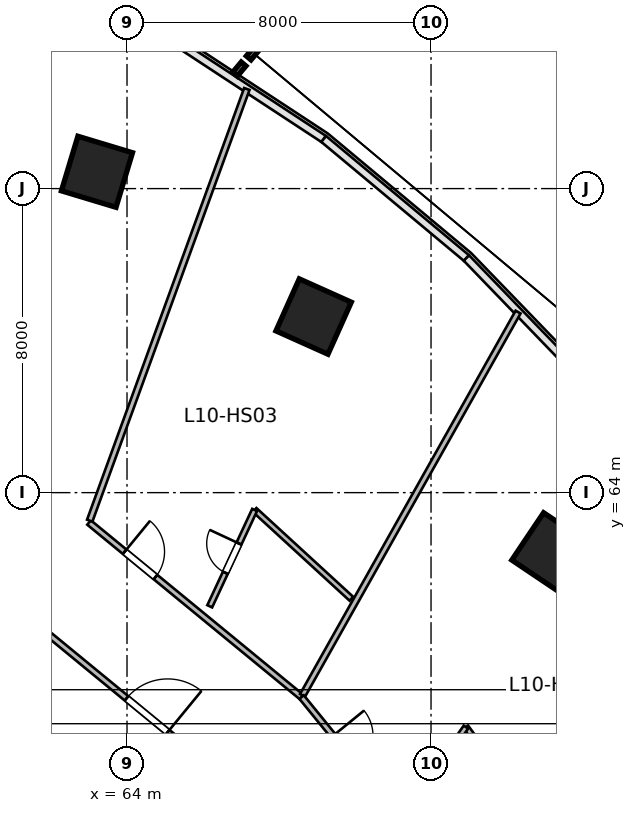
"""IFC4 building model, lengths in metres.
Left out: names, types, materials, properties, quantities, classifications, styles, units other than length and angle.
Written with IfcOpenShell. Run it as: python <this file> out.ifc"""

import sys

from ifc_helpers import new_model, si_unit, direction, frame, frame_2d, origin, origin_2d, place, context, subcontext, project, spatial, rectangle, extrude, source, transform, mapped, element, fill, save


model = new_model("IFC4")
c1 = context("Model", 3, precision=1e-05, world=origin(), true_north=direction((0.0, 1.0)))
c2 = subcontext(c1, "Body", "Model", "MODEL_VIEW")
j1 = project(units=[si_unit("LENGTHUNIT", "METRE"), si_unit("PLANEANGLEUNIT", "RADIAN")], contexts=[c1])
p1 = place(None, origin())
s1 = spatial("IfcSite", under=j1, at=p1, CompositionType="ELEMENT")
p2 = place(p1, origin())
s2 = spatial("IfcBuilding", under=s1, at=p2, CompositionType="ELEMENT")
p3 = place(p2, frame((0.0, 0.0, 49.8)))
s3 = spatial("IfcBuildingStorey", under=s2, at=p3, CompositionType="ELEMENT", Elevation=49.8)
m1 = source(origin(), c2, "Body", "SweptSolid", [
    extrude(rectangle(XDim=1.5, YDim=1.5, at=origin_2d()), origin(), (0.0, 0.0, 1.0), 3.6),
])
for number, where, z_axis, x_axis in (
    (1, (63.209, 72.442, 0.0), (0.0, 0.0, 1.0), (0.289, 0.957, 0.0)),
    (2, (68.91, 68.633, 0.0), (0.0, 0.0, 1.0), (0.409, 0.912, 0.0)),
    (3, (75.167, 62.43, 0.0), (0.0, 0.0, 1.0), (0.558, 0.83, 0.0)),
):
    element("IfcColumn", number, at=place(p3, frame(where, z_axis=z_axis, x_axis=x_axis)), inside=s3, PredefinedType="COLUMN", context=c2, shape_type="MappedRepresentation", body=[
        mapped(m1, transform((0.0, 0.0, 0.0), scale=1.0)),
    ])
m2 = source(origin(), c2, "Body", "SweptSolid", [
    extrude(rectangle(XDim=7.237, YDim=0.15, at=frame_2d((3.618, 0.0))), origin(), (0.0, 0.0, 1.0), 3.36),
])
p4 = place(p3, frame((63.001, 63.214, 0.0), z_axis=(0.0, 0.0, 1.0), x_axis=(0.772813707793, -0.634632943557, 0.0)))
e4 = element("IfcWall", 4, at=p4, inside=s3, PredefinedType="PARTITIONING", context=c2, shape_type="MappedRepresentation", body=[
    mapped(m2, transform((0.0, 0.0, 0.0), scale=1.0)),
])
p5 = place(p4, frame((1.212, 0.0, 0.0)))
e5 = element("IfcOpeningElement", 5, at=p5, cuts=e4, PredefinedType="OPENING", context=c2, shape_type="SweptSolid", body=[
    extrude(rectangle(XDim=1.05, YDim=2.15, at=frame_2d((0.525, 1.075))), frame((0.0, 0.085, 0.0), z_axis=(0.0, -1.0, 0.0), x_axis=(1.0, 0.0, 0.0)), (0.0, 0.0, 1.0), 0.17),
])
m3 = source(origin(), c2, "Body", "SweptSolid", [
    extrude(rectangle(XDim=12.088, YDim=0.15, at=frame_2d((6.044, 0.0))), origin(), (0.0, 0.0, 1.0), 3.36),
])
p6 = place(p3, frame((63.019, 63.262, 0.0), z_axis=(0.0, 0.0, 1.0), x_axis=(0.34203007529, 0.939689005787, 0.0)))
e6 = element("IfcWall", 6, at=p6, inside=s3, PredefinedType="PARTITIONING", context=c2, shape_type="MappedRepresentation", body=[
    mapped(m3, transform((0.0, 0.0, 0.0), scale=1.0)),
])
m4 = source(origin(), c2, "Body", "SweptSolid", [
    extrude(rectangle(XDim=11.573, YDim=0.15, at=frame_2d((5.786, 0.0))), origin(), (0.0, 0.0, 1.0), 3.36),
])
p7 = place(p3, frame((68.618, 58.664, 0.0), z_axis=(0.0, 0.0, 1.0), x_axis=(0.490161073951, 0.871631872744, 0.0)))
e7 = element("IfcWall", 7, at=p7, inside=s3, PredefinedType="PARTITIONING", context=c2, shape_type="MappedRepresentation", body=[
    mapped(m4, transform((0.0, 0.0, 0.0), scale=1.0)),
])
m5 = source(origin(), c2, "Body", "SweptSolid", [
    extrude(rectangle(XDim=3.456, YDim=0.14, at=frame_2d((1.728, 0.0))), origin(), (0.0, 0.0, 1.0), 3.36),
])
p8 = place(p3, frame((67.358, 63.544, 0.0), z_axis=(0.0, 0.0, 1.0), x_axis=(0.736860870293, -0.676044420013, 0.0)))
e8 = element("IfcWall", 8, at=p8, inside=s3, PredefinedType="PARTITIONING", context=c2, shape_type="MappedRepresentation", body=[
    mapped(m5, transform((0.0, 0.0, 0.0), scale=1.0)),
])
m6 = source(origin(), c2, "Body", "SweptSolid", [
    extrude(rectangle(XDim=2.796, YDim=0.14, at=frame_2d((1.398, 0.0))), origin(), (0.0, 0.0, 1.0), 3.36),
])
p9 = place(p3, frame((66.177, 61.009, 0.0), z_axis=(0.0, 0.0, 1.0), x_axis=(0.422316594955, 0.906448395456, 0.0)))
e9 = element("IfcWall", 9, at=p9, inside=s3, PredefinedType="PARTITIONING", context=c2, shape_type="MappedRepresentation", body=[
    mapped(m6, transform((0.0, 0.0, 0.0), scale=1.0)),
])
p10 = place(p9, frame((0.973, 0.0, 0.0)))
e10 = element("IfcOpeningElement", 10, at=p10, cuts=e9, PredefinedType="OPENING", context=c2, shape_type="SweptSolid", body=[
    extrude(rectangle(XDim=0.85, YDim=2.05, at=frame_2d((0.425, 1.025))), frame((0.0, 0.08, 0.0), z_axis=(0.0, -1.0, 0.0), x_axis=(1.0, 0.0, 0.0)), (0.0, 0.0, 1.0), 0.16),
])
m7 = source(origin(), c2, "Body", "SweptSolid", [
    extrude(rectangle(XDim=7.659, YDim=0.15, at=frame_2d((3.829, 0.0))), origin(), (0.0, 0.0, 1.0), 3.36),
])
p11 = place(p3, frame((68.594, 58.621, 0.0), z_axis=(0.0, 0.0, 1.0), x_axis=(0.631489868862, -0.775384127723, 0.0)))
e11 = element("IfcWall", 11, at=p11, inside=s3, PredefinedType="PARTITIONING", context=c2, shape_type="MappedRepresentation", body=[
    mapped(m7, transform((0.0, 0.0, 0.0), scale=1.0)),
])
p12 = place(p11, frame((1.313, 0.0, 0.0)))
e12 = element("IfcOpeningElement", 12, at=p12, cuts=e11, PredefinedType="OPENING", context=c2, shape_type="SweptSolid", body=[
    extrude(rectangle(XDim=1.05, YDim=2.15, at=frame_2d((0.525, 1.075))), frame((0.0, 0.085, 0.0), z_axis=(0.0, -1.0, 0.0), x_axis=(1.0, 0.0, 0.0)), (0.0, 0.0, 1.0), 0.17),
])
m8 = source(origin(), c2, "Body", "SweptSolid", [
    extrude(rectangle(XDim=10.975, YDim=0.15, at=frame_2d((5.487, 0.0))), origin(), (0.0, 0.0, 1.0), 3.36),
])
p13 = place(p3, frame((73.46, 52.719, 0.0), z_axis=(0.0, 0.0, 1.0), x_axis=(0.638125265812, 0.769932558821, 0.0)))
e13 = element("IfcWall", 13, at=p13, inside=s3, PredefinedType="PARTITIONING", context=c2, shape_type="MappedRepresentation", body=[
    mapped(m8, transform((0.0, 0.0, 0.0), scale=1.0)),
])
m9 = source(origin(), c2, "Body", "SweptSolid", [
    extrude(rectangle(XDim=3.656, YDim=0.14, at=frame_2d((1.828, 0.0))), origin(), (0.0, 0.0, 1.0), 3.36),
])
p14 = place(p3, frame((72.918, 57.831, 0.0), z_axis=(0.0, 0.0, 1.0), x_axis=(0.592700141555, -0.805423206892, 0.0)))
e14 = element("IfcWall", 14, at=p14, inside=s3, PredefinedType="PARTITIONING", context=c2, shape_type="MappedRepresentation", body=[
    mapped(m9, transform((0.0, 0.0, 0.0), scale=1.0)),
])
m10 = source(origin(), c2, "Body", "SweptSolid", [
    extrude(rectangle(XDim=2.663, YDim=0.14, at=frame_2d((1.332, 0.0))), origin(), (0.0, 0.0, 1.0), 3.36),
])
p15 = place(p3, frame((71.397, 55.645, 0.0), z_axis=(0.0, 0.0, 1.0), x_axis=(0.570905989724, 0.821015438891, 0.0)))
e15 = element("IfcWall", 15, at=p15, inside=s3, PredefinedType="PARTITIONING", context=c2, shape_type="MappedRepresentation", body=[
    mapped(m10, transform((0.0, 0.0, 0.0), scale=1.0)),
])
p16 = place(p15, frame((0.906, 0.0, 0.0)))
e16 = element("IfcOpeningElement", 16, at=p16, cuts=e15, PredefinedType="OPENING", context=c2, shape_type="SweptSolid", body=[
    extrude(rectangle(XDim=0.85, YDim=2.05, at=frame_2d((0.425, 1.025))), frame((0.0, 0.08, 0.0), z_axis=(0.0, -1.0, 0.0), x_axis=(1.0, 0.0, 0.0)), (0.0, 0.0, 1.0), 0.16),
])
m11 = source(origin(), c2, "Body", "SweptSolid", [
    extrude(rectangle(XDim=6.721, YDim=0.15, at=frame_2d((3.361, 0.0))), origin(), (0.0, 0.0, 1.0), 3.36),
])
p17 = place(p3, frame((61.931, 60.275, 0.0), z_axis=(0.0, 0.0, 1.0), x_axis=(0.772828051199, -0.63461547671, 0.0)))
e17 = element("IfcWall", 17, at=p17, inside=s3, PredefinedType="PARTITIONING", context=c2, shape_type="MappedRepresentation", body=[
    mapped(m11, transform((0.0, 0.0, 0.0), scale=1.0)),
])
p18 = place(p17, frame((2.66, 0.0, 0.0)))
e18 = element("IfcOpeningElement", 18, at=p18, cuts=e17, PredefinedType="OPENING", context=c2, shape_type="SweptSolid", body=[
    extrude(rectangle(XDim=1.4, YDim=2.15, at=frame_2d((0.7, 1.075))), frame((0.0, 0.085, 0.0), z_axis=(0.0, -1.0, 0.0), x_axis=(1.0, 0.0, 0.0)), (0.0, 0.0, 1.0), 0.17),
])
m12 = source(origin(), c2, "Body", "SweptSolid", [
    extrude(rectangle(XDim=1.05, YDim=2.15, at=frame_2d((0.525, 1.075))), frame((0.0, 0.025, 0.0), z_axis=(0.0, -1.0, 0.0), x_axis=(1.0, 0.0, 0.0)), (0.0, 0.0, 1.0), 0.05),
])
p19 = place(p5, origin())
e19 = element("IfcDoor", 19, at=p19, inside=s3, OperationType="SINGLE_SWING_LEFT", PredefinedType="DOOR", context=c2, shape_type="MappedRepresentation", body=[
    mapped(m12, transform((0.0, 0.0, 0.0), scale=1.0)),
])
fill(e5, e19)
m13 = source(origin(), c2, "Body", "SweptSolid", [
    extrude(rectangle(XDim=0.85, YDim=2.05, at=frame_2d((0.425, 1.025))), frame((0.0, 0.025, 0.0), z_axis=(0.0, -1.0, 0.0), x_axis=(1.0, 0.0, 0.0)), (0.0, 0.0, 1.0), 0.05),
])
p20 = place(p10, origin())
e20 = element("IfcDoor", 20, at=p20, inside=s3, OperationType="SINGLE_SWING_RIGHT", PredefinedType="DOOR", context=c2, shape_type="MappedRepresentation", body=[
    mapped(m13, transform((0.0, 0.0, 0.0), scale=1.0)),
])
fill(e10, e20)
m14 = source(origin(), c2, "Body", "SweptSolid", [
    extrude(rectangle(XDim=1.4, YDim=2.15, at=frame_2d((0.7, 1.075))), frame((0.0, 0.025, 0.0), z_axis=(0.0, -1.0, 0.0), x_axis=(1.0, 0.0, 0.0)), (0.0, 0.0, 1.0), 0.05),
])
p21 = place(p18, origin())
e21 = element("IfcDoor", 21, at=p21, inside=s3, OperationType="SINGLE_SWING_RIGHT", PredefinedType="DOOR", context=c2, shape_type="MappedRepresentation", body=[
    mapped(m14, transform((0.0, 0.0, 0.0), scale=1.0)),
])
fill(e18, e21)
save(model, sys.argv[1])
